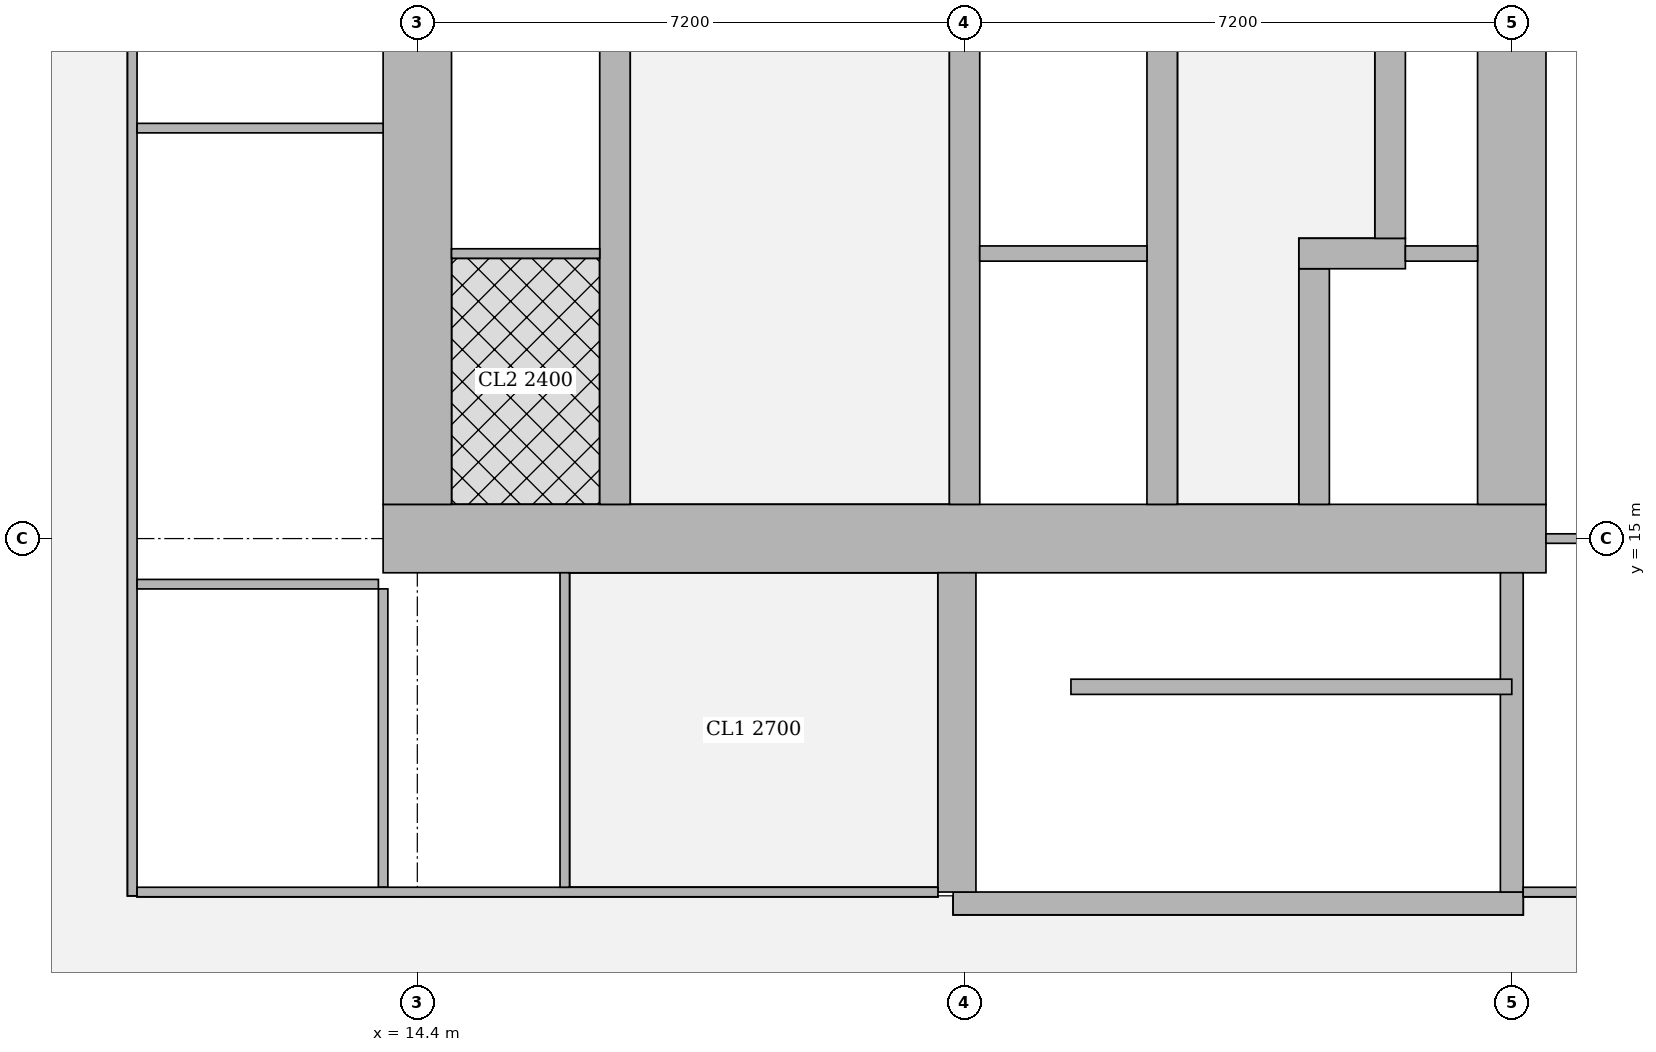
"""IFC4 building model, lengths in metres.
Left out: names, types, materials, properties, quantities, classifications, styles, units other than length and angle.
Written with IfcOpenShell. Run it as: python <this file> out.ifc"""

import sys

from ifc_helpers import new_model, si_unit, direction, frame, frame_2d, origin, place, context, subcontext, project, spatial, rectangle, extrude, element, fill, save


model = new_model("IFC4")
c1 = context("Model", 3, precision=1e-05, world=origin(), true_north=direction((0.0, 1.0)))
c2 = subcontext(c1, "Body", "Model", "MODEL_VIEW")
j1 = project(units=[si_unit("LENGTHUNIT", "METRE"), si_unit("PLANEANGLEUNIT", "RADIAN")], contexts=[c1])
p1 = place(None, origin())
s1 = spatial("IfcSite", under=j1, at=p1, CompositionType="ELEMENT")
p2 = place(p1, origin())
s2 = spatial("IfcBuilding", under=s1, at=p2, CompositionType="ELEMENT")
p3 = place(p2, frame((0.0, 0.0, 204.95)))
s3 = spatial("IfcBuildingStorey", under=s2, at=p3, CompositionType="ELEMENT", Elevation=204.95)
p4 = place(p3, frame((13.95, 15.0, 0.0), z_axis=(0.0, 0.0, 1.0), x_axis=(1.0, 0.0, 0.0)))
e1 = element("IfcWall", 1, at=p4, inside=s3, PredefinedType="SHEAR", context=c2, shape_type="SweptSolid", body=[
    extrude(rectangle(XDim=15.3, YDim=0.9, at=frame_2d((7.65, 0.0))), origin(), (0.0, 0.0, 1.0), 3.75),
])
p5 = place(p4, frame((4.45, 0.0, 0.0)))
e2 = element("IfcOpeningElement", 2, at=p5, cuts=e1, PredefinedType="OPENING", context=c2, shape_type="SweptSolid", body=[
    extrude(rectangle(XDim=1.8, YDim=2.1, at=frame_2d((0.9, 1.05))), frame((0.0, 0.46, 0.0), z_axis=(0.0, -1.0, 0.0), x_axis=(1.0, 0.0, 0.0)), (0.0, 0.0, 1.0), 0.92),
])
p6 = place(p4, frame((10.7, 0.0, 0.0)))
e3 = element("IfcOpeningElement", 3, at=p6, cuts=e1, PredefinedType="OPENING", context=c2, shape_type="SweptSolid", body=[
    extrude(rectangle(XDim=1.1, YDim=2.1, at=frame_2d((0.55, 1.05))), frame((0.0, 0.46, 0.0), z_axis=(0.0, -1.0, 0.0), x_axis=(1.0, 0.0, 0.0)), (0.0, 0.0, 1.0), 0.92),
])
for number, where, z_axis, x_axis in (
    (4, (14.4, 15.45, 0.0), (0.0, 0.0, 1.0), (0.0, 1.0, 0.0)),
    (5, (28.8, 15.45, 0.0), (0.0, 0.0, 1.0), (0.0, 1.0, 0.0)),
):
    element("IfcWall", number, at=place(p3, frame(where, z_axis=z_axis, x_axis=x_axis)), inside=s3, PredefinedType="SHEAR", context=c2, shape_type="SweptSolid", body=[
        extrude(rectangle(XDim=14.1, YDim=0.9, at=frame_2d((7.05, 0.0))), origin(), (0.0, 0.0, 1.0), 3.75),
    ])
p7 = place(p3, frame((17.0, 15.45, 0.0), z_axis=(0.0, 0.0, 1.0), x_axis=(0.0, 1.0, 0.0)))
e6 = element("IfcWall", 6, at=p7, inside=s3, PredefinedType="SHEAR", context=c2, shape_type="SweptSolid", body=[
    extrude(rectangle(XDim=14.1, YDim=0.4, at=frame_2d((7.05, 0.0))), origin(), (0.0, 0.0, 1.0), 3.75),
])
p8 = place(p7, frame((0.925, 0.0, 0.0)))
e7 = element("IfcOpeningElement", 7, at=p8, cuts=e6, PredefinedType="OPENING", context=c2, shape_type="SweptSolid", body=[
    extrude(rectangle(XDim=1.0, YDim=2.1, at=frame_2d((0.5, 1.05))), frame((0.0, 0.21, 0.0), z_axis=(0.0, -1.0, 0.0), x_axis=(1.0, 0.0, 0.0)), (0.0, 0.0, 1.0), 0.42),
])
p9 = place(p7, frame((4.675, 0.0, 0.0)))
e8 = element("IfcOpeningElement", 8, at=p9, cuts=e6, PredefinedType="OPENING", context=c2, shape_type="SweptSolid", body=[
    extrude(rectangle(XDim=1.0, YDim=2.1, at=frame_2d((0.5, 1.05))), frame((0.0, 0.21, 0.0), z_axis=(0.0, -1.0, 0.0), x_axis=(1.0, 0.0, 0.0)), (0.0, 0.0, 1.0), 0.42),
])
p10 = place(p7, frame((8.425, 0.0, 0.0)))
e9 = element("IfcOpeningElement", 9, at=p10, cuts=e6, PredefinedType="OPENING", context=c2, shape_type="SweptSolid", body=[
    extrude(rectangle(XDim=1.0, YDim=2.1, at=frame_2d((0.5, 1.05))), frame((0.0, 0.21, 0.0), z_axis=(0.0, -1.0, 0.0), x_axis=(1.0, 0.0, 0.0)), (0.0, 0.0, 1.0), 0.42),
])
p11 = place(p7, frame((12.175, 0.0, 0.0)))
e10 = element("IfcOpeningElement", 10, at=p11, cuts=e6, PredefinedType="OPENING", context=c2, shape_type="SweptSolid", body=[
    extrude(rectangle(XDim=1.0, YDim=2.1, at=frame_2d((0.5, 1.05))), frame((0.0, 0.21, 0.0), z_axis=(0.0, -1.0, 0.0), x_axis=(1.0, 0.0, 0.0)), (0.0, 0.0, 1.0), 0.42),
])
p12 = place(p3, frame((21.6, 15.45, 0.0), z_axis=(0.0, 0.0, 1.0), x_axis=(0.0, 1.0, 0.0)))
e11 = element("IfcWall", 11, at=p12, inside=s3, PredefinedType="SHEAR", context=c2, shape_type="SweptSolid", body=[
    extrude(rectangle(XDim=14.1, YDim=0.4, at=frame_2d((7.05, 0.0))), origin(), (0.0, 0.0, 1.0), 3.75),
])
p13 = place(p12, frame((0.875, 0.0, 0.0)))
e12 = element("IfcOpeningElement", 12, at=p13, cuts=e11, PredefinedType="OPENING", context=c2, shape_type="SweptSolid", body=[
    extrude(rectangle(XDim=1.1, YDim=2.1, at=frame_2d((0.55, 1.05))), frame((0.0, 0.21, 0.0), z_axis=(0.0, -1.0, 0.0), x_axis=(1.0, 0.0, 0.0)), (0.0, 0.0, 1.0), 0.42),
])
p14 = place(p12, frame((4.625, 0.0, 0.0)))
e13 = element("IfcOpeningElement", 13, at=p14, cuts=e11, PredefinedType="OPENING", context=c2, shape_type="SweptSolid", body=[
    extrude(rectangle(XDim=1.1, YDim=2.1, at=frame_2d((0.55, 1.05))), frame((0.0, 0.21, 0.0), z_axis=(0.0, -1.0, 0.0), x_axis=(1.0, 0.0, 0.0)), (0.0, 0.0, 1.0), 0.42),
])
p15 = place(p12, frame((8.375, 0.0, 0.0)))
e14 = element("IfcOpeningElement", 14, at=p15, cuts=e11, PredefinedType="OPENING", context=c2, shape_type="SweptSolid", body=[
    extrude(rectangle(XDim=1.1, YDim=2.1, at=frame_2d((0.55, 1.05))), frame((0.0, 0.21, 0.0), z_axis=(0.0, -1.0, 0.0), x_axis=(1.0, 0.0, 0.0)), (0.0, 0.0, 1.0), 0.42),
])
p16 = place(p12, frame((12.125, 0.0, 0.0)))
e15 = element("IfcOpeningElement", 15, at=p16, cuts=e11, PredefinedType="OPENING", context=c2, shape_type="SweptSolid", body=[
    extrude(rectangle(XDim=1.1, YDim=2.1, at=frame_2d((0.55, 1.05))), frame((0.0, 0.21, 0.0), z_axis=(0.0, -1.0, 0.0), x_axis=(1.0, 0.0, 0.0)), (0.0, 0.0, 1.0), 0.42),
])
p17 = place(p3, frame((24.2, 15.45, 0.0), z_axis=(0.0, 0.0, 1.0), x_axis=(0.0, 1.0, 0.0)))
e16 = element("IfcWall", 16, at=p17, inside=s3, PredefinedType="SHEAR", context=c2, shape_type="SweptSolid", body=[
    extrude(rectangle(XDim=14.1, YDim=0.4, at=frame_2d((7.05, 0.0))), origin(), (0.0, 0.0, 1.0), 3.75),
])
p18 = place(p3, frame((26.2, 15.45, 0.0), z_axis=(0.0, 0.0, 1.0), x_axis=(0.0, 1.0, 0.0)))
e17 = element("IfcWall", 17, at=p18, inside=s3, PredefinedType="SHEAR", context=c2, shape_type="SweptSolid", body=[
    extrude(rectangle(XDim=3.1, YDim=0.4, at=frame_2d((1.55, 0.0))), origin(), (0.0, 0.0, 1.0), 3.75),
])
p19 = place(p18, frame((0.825, 0.0, 0.0)))
e18 = element("IfcOpeningElement", 18, at=p19, cuts=e17, PredefinedType="OPENING", context=c2, shape_type="SweptSolid", body=[
    extrude(rectangle(XDim=1.2, YDim=2.1, at=frame_2d((0.6, 1.05))), frame((0.0, 0.21, 0.0), z_axis=(0.0, -1.0, 0.0), x_axis=(1.0, 0.0, 0.0)), (0.0, 0.0, 1.0), 0.42),
])
p20 = place(p3, frame((26.0, 18.75, 0.0), z_axis=(0.0, 0.0, 1.0), x_axis=(1.0, 0.0, 0.0)))
e19 = element("IfcWall", 19, at=p20, inside=s3, PredefinedType="SHEAR", context=c2, shape_type="SweptSolid", body=[
    extrude(rectangle(XDim=1.4, YDim=0.4, at=frame_2d((0.7, 0.0))), origin(), (0.0, 0.0, 1.0), 3.75),
])
p21 = place(p3, frame((27.2, 18.95, 0.0), z_axis=(0.0, 0.0, 1.0), x_axis=(0.0, 1.0, 0.0)))
e20 = element("IfcWall", 20, at=p21, inside=s3, PredefinedType="SHEAR", context=c2, shape_type="SweptSolid", body=[
    extrude(rectangle(XDim=7.1, YDim=0.4, at=frame_2d((3.55, 0.0))), origin(), (0.0, 0.0, 1.0), 3.75),
])
p22 = place(p3, frame((21.45, 10.2, 0.0), z_axis=(0.0, 0.0, 1.0), x_axis=(1.0, 0.0, 0.0)))
e21 = element("IfcWall", 21, at=p22, inside=s3, PredefinedType="SHEAR", context=c2, shape_type="SweptSolid", body=[
    extrude(rectangle(XDim=7.5, YDim=0.3, at=frame_2d((3.75, 0.0))), origin(), (0.0, 0.0, 1.0), 3.75),
])
p23 = place(p22, frame((0.5, 0.0, 0.0)))
e22 = element("IfcOpeningElement", 22, at=p23, cuts=e21, PredefinedType="OPENING", context=c2, shape_type="SweptSolid", body=[
    extrude(rectangle(XDim=1.1, YDim=2.1, at=frame_2d((0.55, 1.05))), frame((0.0, 0.16, 0.0), z_axis=(0.0, -1.0, 0.0), x_axis=(1.0, 0.0, 0.0)), (0.0, 0.0, 1.0), 0.32),
])
p24 = place(p3, frame((21.5, 10.35, 0.0), z_axis=(0.0, 0.0, 1.0), x_axis=(0.0, 1.0, 0.0)))
e23 = element("IfcWall", 23, at=p24, inside=s3, PredefinedType="SHEAR", context=c2, shape_type="SweptSolid", body=[
    extrude(rectangle(XDim=4.2, YDim=0.5, at=frame_2d((2.1, 0.0))), origin(), (0.0, 0.0, 1.0), 3.75),
])
p25 = place(p3, frame((28.8, 10.35, 0.0), z_axis=(0.0, 0.0, 1.0), x_axis=(0.0, 1.0, 0.0)))
e24 = element("IfcWall", 24, at=p25, inside=s3, PredefinedType="SHEAR", context=c2, shape_type="SweptSolid", body=[
    extrude(rectangle(XDim=4.2, YDim=0.3, at=frame_2d((2.1, 0.0))), origin(), (0.0, 0.0, 1.0), 3.75),
])
p26 = place(p3, frame((10.65, 10.3, 0.0), z_axis=(0.0, 0.0, 1.0), x_axis=(0.0, 1.0, 0.0)))
e25 = element("IfcWall", 25, at=p26, inside=s3, PredefinedType="PARTITIONING", context=c2, shape_type="SweptSolid", body=[
    extrude(rectangle(XDim=24.4, YDim=0.125, at=frame_2d((12.2, 0.0))), origin(), (0.0, 0.0, 1.0), 3.5),
])
p27 = place(p26, frame((1.55, 0.0, 0.0)))
e26 = element("IfcOpeningElement", 26, at=p27, cuts=e25, PredefinedType="OPENING", context=c2, shape_type="SweptSolid", body=[
    extrude(rectangle(XDim=1.0, YDim=2.1, at=frame_2d((0.5, 1.05))), frame((0.0, 0.073, 0.0), z_axis=(0.0, -1.0, 0.0), x_axis=(1.0, 0.0, 0.0)), (0.0, 0.0, 1.0), 0.145),
])
p28 = place(p26, frame((6.6, 0.0, 0.0)))
e27 = element("IfcOpeningElement", 27, at=p28, cuts=e25, PredefinedType="OPENING", context=c2, shape_type="SweptSolid", body=[
    extrude(rectangle(XDim=1.0, YDim=2.1, at=frame_2d((0.5, 1.05))), frame((0.0, 0.073, 0.0), z_axis=(0.0, -1.0, 0.0), x_axis=(1.0, 0.0, 0.0)), (0.0, 0.0, 1.0), 0.145),
])
p29 = place(p26, frame((11.4, 0.0, 0.0)))
e28 = element("IfcOpeningElement", 28, at=p29, cuts=e25, PredefinedType="OPENING", context=c2, shape_type="SweptSolid", body=[
    extrude(rectangle(XDim=1.0, YDim=2.1, at=frame_2d((0.5, 1.05))), frame((0.0, 0.073, 0.0), z_axis=(0.0, -1.0, 0.0), x_axis=(1.0, 0.0, 0.0)), (0.0, 0.0, 1.0), 0.145),
])
p30 = place(p26, frame((18.55, 0.0, 0.0)))
e29 = element("IfcOpeningElement", 29, at=p30, cuts=e25, PredefinedType="OPENING", context=c2, shape_type="SweptSolid", body=[
    extrude(rectangle(XDim=1.0, YDim=2.1, at=frame_2d((0.5, 1.05))), frame((0.0, 0.073, 0.0), z_axis=(0.0, -1.0, 0.0), x_axis=(1.0, 0.0, 0.0)), (0.0, 0.0, 1.0), 0.145),
])
p31 = place(p3, frame((10.713, 14.4, 0.0), z_axis=(0.0, 0.0, 1.0), x_axis=(1.0, 0.0, 0.0)))
e30 = element("IfcWall", 30, at=p31, inside=s3, PredefinedType="PARTITIONING", context=c2, shape_type="SweptSolid", body=[
    extrude(rectangle(XDim=3.175, YDim=0.125, at=frame_2d((1.587, 0.0))), origin(), (0.0, 0.0, 1.0), 3.5),
])
p32 = place(p3, frame((10.713, 20.4, 0.0), z_axis=(0.0, 0.0, 1.0), x_axis=(1.0, 0.0, 0.0)))
e31 = element("IfcWall", 31, at=p32, inside=s3, PredefinedType="PARTITIONING", context=c2, shape_type="SweptSolid", body=[
    extrude(rectangle(XDim=3.237, YDim=0.125, at=frame_2d((1.619, 0.0))), origin(), (0.0, 0.0, 1.0), 3.5),
])
p33 = place(p3, frame((13.95, 10.413, 0.0), z_axis=(0.0, 0.0, 1.0), x_axis=(0.0, 1.0, 0.0)))
e32 = element("IfcWall", 32, at=p33, inside=s3, PredefinedType="PARTITIONING", context=c2, shape_type="SweptSolid", body=[
    extrude(rectangle(XDim=3.925, YDim=0.125, at=frame_2d((1.962, 0.0))), origin(), (0.0, 0.0, 1.0), 3.5),
])
p34 = place(p3, frame((10.713, 10.35, 0.0), z_axis=(0.0, 0.0, 1.0), x_axis=(1.0, 0.0, 0.0)))
e33 = element("IfcWall", 33, at=p34, inside=s3, PredefinedType="PARTITIONING", context=c2, shape_type="SweptSolid", body=[
    extrude(rectangle(XDim=10.537, YDim=0.125, at=frame_2d((5.269, 0.0))), origin(), (0.0, 0.0, 1.0), 3.5),
])
p35 = place(p34, frame((7.282, 0.0, 0.0)))
e34 = element("IfcOpeningElement", 34, at=p35, cuts=e33, PredefinedType="OPENING", context=c2, shape_type="SweptSolid", body=[
    extrude(rectangle(XDim=1.8, YDim=2.1, at=frame_2d((0.9, 1.05))), frame((0.0, 0.073, 0.0), z_axis=(0.0, -1.0, 0.0), x_axis=(1.0, 0.0, 0.0)), (0.0, 0.0, 1.0), 0.145),
])
p36 = place(p3, frame((16.34, 10.413, 0.0), z_axis=(0.0, 0.0, 1.0), x_axis=(0.0, 1.0, 0.0)))
e35 = element("IfcWall", 35, at=p36, inside=s3, PredefinedType="PARTITIONING", context=c2, shape_type="SweptSolid", body=[
    extrude(rectangle(XDim=4.137, YDim=0.125, at=frame_2d((2.068, 0.0))), origin(), (0.0, 0.0, 1.0), 3.5),
])
p37 = place(p36, frame((1.512, 0.0, 0.0)))
e36 = element("IfcOpeningElement", 36, at=p37, cuts=e35, PredefinedType="OPENING", context=c2, shape_type="SweptSolid", body=[
    extrude(rectangle(XDim=1.0, YDim=2.1, at=frame_2d((0.5, 1.05))), frame((0.0, 0.073, 0.0), z_axis=(0.0, -1.0, 0.0), x_axis=(1.0, 0.0, 0.0)), (0.0, 0.0, 1.0), 0.145),
])
p38 = place(p3, frame((28.95, 10.35, 0.0), z_axis=(0.0, 0.0, 1.0), x_axis=(1.0, 0.0, 0.0)))
e37 = element("IfcWall", 37, at=p38, inside=s3, PredefinedType="PARTITIONING", context=c2, shape_type="SweptSolid", body=[
    extrude(rectangle(XDim=8.886, YDim=0.125, at=frame_2d((4.443, 0.0))), origin(), (0.0, 0.0, 1.0), 3.5),
])
p39 = place(p3, frame((29.25, 15.0, 0.0), z_axis=(0.0, 0.0, 1.0), x_axis=(1.0, 0.0, 0.0)))
e38 = element("IfcWall", 38, at=p39, inside=s3, PredefinedType="PARTITIONING", context=c2, shape_type="SweptSolid", body=[
    extrude(rectangle(XDim=6.049, YDim=0.125, at=frame_2d((3.024, 0.0))), origin(), (0.0, 0.0, 1.0), 3.5),
])
p40 = place(p3, frame((14.85, 18.75, 0.0), z_axis=(0.0, 0.0, 1.0), x_axis=(1.0, 0.0, 0.0)))
e39 = element("IfcWall", 39, at=p40, inside=s3, PredefinedType="PARTITIONING", context=c2, shape_type="SweptSolid", body=[
    extrude(rectangle(XDim=1.95, YDim=0.125, at=frame_2d((0.975, 0.0))), origin(), (0.0, 0.0, 1.0), 3.5),
])
p41 = place(p3, frame((23.0, 13.05, 0.0), z_axis=(0.0, 0.0, 1.0), x_axis=(1.0, 0.0, 0.0)))
e40 = element("IfcWall", 40, at=p41, inside=s3, PredefinedType="SHEAR", context=c2, shape_type="SweptSolid", body=[
    extrude(rectangle(XDim=5.8, YDim=0.2, at=frame_2d((2.9, 0.0))), origin(), (0.0, 0.0, 1.0), 3.75),
])
p42 = place(p3, frame((21.8, 18.75, 0.0), z_axis=(0.0, 0.0, 1.0), x_axis=(1.0, 0.0, 0.0)))
e41 = element("IfcWall", 41, at=p42, inside=s3, PredefinedType="SOLIDWALL", context=c2, shape_type="SweptSolid", body=[
    extrude(rectangle(XDim=2.2, YDim=0.2, at=frame_2d((1.1, 0.0))), origin(), (0.0, 0.0, 1.0), 3.5),
])
p43 = place(p3, frame((27.4, 18.75, 0.0), z_axis=(0.0, 0.0, 1.0), x_axis=(1.0, 0.0, 0.0)))
e42 = element("IfcWall", 42, at=p43, inside=s3, PredefinedType="SOLIDWALL", context=c2, shape_type="SweptSolid", body=[
    extrude(rectangle(XDim=0.95, YDim=0.2, at=frame_2d((0.475, 0.0))), origin(), (0.0, 0.0, 1.0), 3.5),
])
p44 = place(p27, origin())
e43 = element("IfcDoor", 43, at=p44, inside=s3, OperationType="SINGLE_SWING_RIGHT", PredefinedType="DOOR", context=c2, shape_type="SweptSolid", body=[
    extrude(rectangle(XDim=1.0, YDim=2.1, at=frame_2d((0.5, 1.05))), frame((0.0, 0.025, 0.0), z_axis=(0.0, -1.0, 0.0), x_axis=(1.0, 0.0, 0.0)), (0.0, 0.0, 1.0), 0.05),
])
fill(e26, e43)
p45 = place(p28, origin())
e44 = element("IfcDoor", 44, at=p45, inside=s3, OperationType="SINGLE_SWING_LEFT", PredefinedType="DOOR", context=c2, shape_type="SweptSolid", body=[
    extrude(rectangle(XDim=1.0, YDim=2.1, at=frame_2d((0.5, 1.05))), frame((0.0, 0.025, 0.0), z_axis=(0.0, -1.0, 0.0), x_axis=(1.0, 0.0, 0.0)), (0.0, 0.0, 1.0), 0.05),
])
fill(e27, e44)
p46 = place(p37, origin())
e45 = element("IfcDoor", 45, at=p46, inside=s3, OperationType="SINGLE_SWING_LEFT", PredefinedType="DOOR", context=c2, shape_type="SweptSolid", body=[
    extrude(rectangle(XDim=1.0, YDim=2.1, at=frame_2d((0.5, 1.05))), frame((0.0, 0.025, 0.0), z_axis=(0.0, -1.0, 0.0), x_axis=(1.0, 0.0, 0.0)), (0.0, 0.0, 1.0), 0.05),
])
fill(e36, e45)
p47 = place(p35, origin())
e46 = element("IfcDoor", 46, at=p47, inside=s3, OperationType="DOUBLE_DOOR_SINGLE_SWING", PredefinedType="DOOR", context=c2, shape_type="SweptSolid", body=[
    extrude(rectangle(XDim=1.8, YDim=2.1, at=frame_2d((0.9, 1.05))), frame((0.0, 0.025, 0.0), z_axis=(0.0, -1.0, 0.0), x_axis=(1.0, 0.0, 0.0)), (0.0, 0.0, 1.0), 0.05),
])
fill(e34, e46)
p48 = place(p8, origin())
e47 = element("IfcDoor", 47, at=p48, inside=s3, OperationType="SINGLE_SWING_LEFT", PredefinedType="DOOR", context=c2, shape_type="SweptSolid", body=[
    extrude(rectangle(XDim=1.0, YDim=2.1, at=frame_2d((0.5, 1.05))), frame((0.0, 0.025, 0.0), z_axis=(0.0, -1.0, 0.0), x_axis=(1.0, 0.0, 0.0)), (0.0, 0.0, 1.0), 0.05),
])
fill(e7, e47)
p49 = place(p9, origin())
e48 = element("IfcDoor", 48, at=p49, inside=s3, OperationType="SINGLE_SWING_LEFT", PredefinedType="DOOR", context=c2, shape_type="SweptSolid", body=[
    extrude(rectangle(XDim=1.0, YDim=2.1, at=frame_2d((0.5, 1.05))), frame((0.0, 0.025, 0.0), z_axis=(0.0, -1.0, 0.0), x_axis=(1.0, 0.0, 0.0)), (0.0, 0.0, 1.0), 0.05),
])
fill(e8, e48)
p50 = place(p5, origin())
e49 = element("IfcDoor", 49, at=p50, inside=s3, OperationType="DOUBLE_DOOR_SINGLE_SWING", PredefinedType="DOOR", context=c2, shape_type="SweptSolid", body=[
    extrude(rectangle(XDim=1.8, YDim=2.1, at=frame_2d((0.9, 1.05))), frame((0.0, 0.025, 0.0), z_axis=(0.0, -1.0, 0.0), x_axis=(1.0, 0.0, 0.0)), (0.0, 0.0, 1.0), 0.05),
])
fill(e2, e49)
p51 = place(p6, origin())
e50 = element("IfcDoor", 50, at=p51, inside=s3, OperationType="SINGLE_SWING_LEFT", PredefinedType="DOOR", context=c2, shape_type="SweptSolid", body=[
    extrude(rectangle(XDim=1.1, YDim=2.1, at=frame_2d((0.55, 1.05))), frame((0.0, 0.025, 0.0), z_axis=(0.0, -1.0, 0.0), x_axis=(1.0, 0.0, 0.0)), (0.0, 0.0, 1.0), 0.05),
])
fill(e3, e50)
p52 = place(p19, origin())
e51 = element("IfcDoor", 51, at=p52, inside=s3, OperationType="DOUBLE_DOOR_SLIDING", PredefinedType="DOOR", context=c2, shape_type="SweptSolid", body=[
    extrude(rectangle(XDim=1.2, YDim=2.1, at=frame_2d((0.6, 1.05))), frame((0.0, 0.025, 0.0), z_axis=(0.0, -1.0, 0.0), x_axis=(1.0, 0.0, 0.0)), (0.0, 0.0, 1.0), 0.05),
])
fill(e18, e51)
p53 = place(p13, origin())
e52 = element("IfcDoor", 52, at=p53, inside=s3, OperationType="DOUBLE_DOOR_SLIDING", PredefinedType="DOOR", context=c2, shape_type="SweptSolid", body=[
    extrude(rectangle(XDim=1.1, YDim=2.1, at=frame_2d((0.55, 1.05))), frame((0.0, 0.025, 0.0), z_axis=(0.0, -1.0, 0.0), x_axis=(1.0, 0.0, 0.0)), (0.0, 0.0, 1.0), 0.05),
])
fill(e12, e52)
p54 = place(p14, origin())
e53 = element("IfcDoor", 53, at=p54, inside=s3, OperationType="DOUBLE_DOOR_SLIDING", PredefinedType="DOOR", context=c2, shape_type="SweptSolid", body=[
    extrude(rectangle(XDim=1.1, YDim=2.1, at=frame_2d((0.55, 1.05))), frame((0.0, 0.025, 0.0), z_axis=(0.0, -1.0, 0.0), x_axis=(1.0, 0.0, 0.0)), (0.0, 0.0, 1.0), 0.05),
])
fill(e13, e53)
p55 = place(p23, origin())
e54 = element("IfcDoor", 54, at=p55, inside=s3, OperationType="SINGLE_SWING_LEFT", PredefinedType="DOOR", context=c2, shape_type="SweptSolid", body=[
    extrude(rectangle(XDim=1.1, YDim=2.1, at=frame_2d((0.55, 1.05))), frame((0.0, 0.025, 0.0), z_axis=(0.0, -1.0, 0.0), x_axis=(1.0, 0.0, 0.0)), (0.0, 0.0, 1.0), 0.05),
])
fill(e22, e54)
save(model, sys.argv[1])
